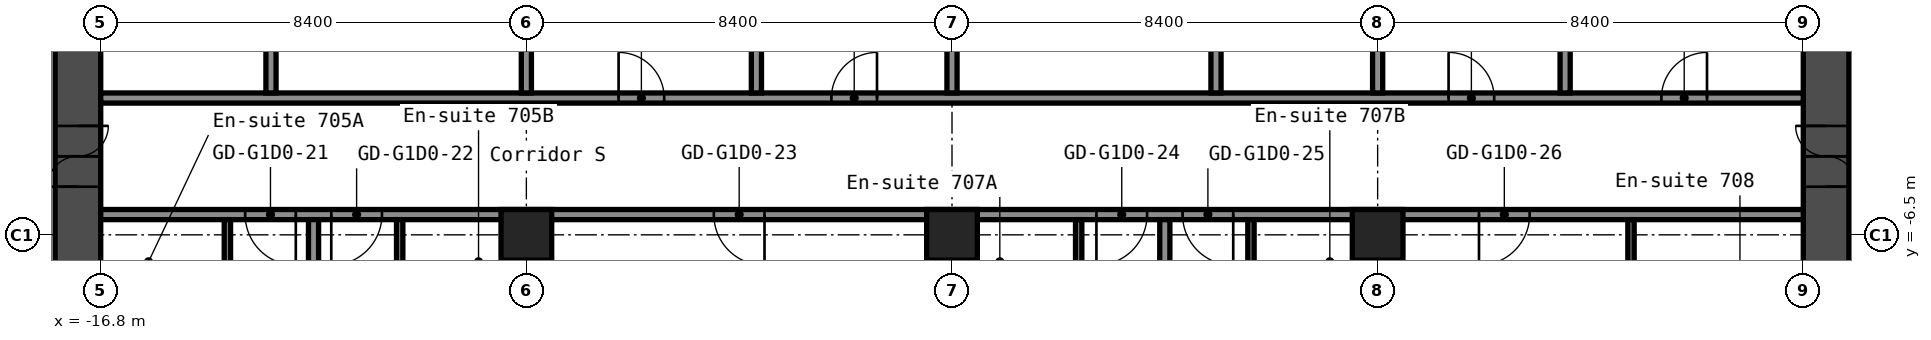
"""IFC4 building model, lengths in metres.
Left out: names, types, materials, properties, quantities, classifications, styles, units other than length and angle.
Written with IfcOpenShell. Run it as: python <this file> out.ifc"""

import sys

from ifc_helpers import new_model, si_unit, direction, frame, frame_2d, origin, origin_2d, place, context, subcontext, project, spatial, rectangle, hollow_rectangle, extrude, element, fill, save


model = new_model("IFC4")
c1 = context("Model", 3, precision=1e-05, world=origin(), true_north=direction((0.0, 1.0)))
c2 = subcontext(c1, "Body", "Model", "MODEL_VIEW")
j1 = project(units=[si_unit("LENGTHUNIT", "METRE"), si_unit("PLANEANGLEUNIT", "RADIAN")], contexts=[c1])
p1 = place(None, origin())
s1 = spatial("IfcSite", under=j1, at=p1, CompositionType="ELEMENT")
p2 = place(p1, origin())
s2 = spatial("IfcBuilding", under=s1, at=p2, CompositionType="ELEMENT")
p3 = place(p2, frame((0.0, 0.0, 29.4)))
s3 = spatial("IfcBuildingStorey", under=s2, at=p3, CompositionType="ELEMENT", Elevation=29.4)
for number, where, z_axis, x_axis in (
    (1, (-8.4, -6.5, 0.0), (0.0, 0.0, 1.0), (1.0, 0.0, 0.0)),
    (2, (0.0, -6.5, 0.0), (0.0, 0.0, 1.0), (1.0, 0.0, 0.0)),
    (3, (8.4, -6.5, 0.0), (0.0, 0.0, 1.0), (1.0, 0.0, 0.0)),
):
    element("IfcColumn", number, at=place(p3, frame(where, z_axis=z_axis, x_axis=x_axis)), inside=s3, PredefinedType="COLUMN", context=c2, shape_type="SweptSolid", body=[
        extrude(hollow_rectangle(XDim=1.0, YDim=1.0, WallThickness=0.04, at=origin_2d()), origin(), (0.0, 0.0, 1.0), 2.8),
    ])
p4 = place(p3, frame((-17.25, -8.4, 0.0), z_axis=(0.0, 0.0, 1.0), x_axis=(0.0, 1.0, 0.0)))
e4 = element("IfcWall", 4, at=p4, inside=s3, PredefinedType="SHEAR", context=c2, shape_type="SweptSolid", body=[
    extrude(rectangle(XDim=16.8, YDim=0.9, at=frame_2d((8.4, 0.0))), origin(), (0.0, 0.0, 1.0), 2.8),
])
p5 = place(p4, frame((12.75, 0.0, 0.0)))
e5 = element("IfcOpeningElement", 5, at=p5, cuts=e4, PredefinedType="OPENING", context=c2, shape_type="SweptSolid", body=[
    extrude(rectangle(XDim=1.2, YDim=2.1, at=frame_2d((0.6, 1.05))), frame((0.0, 0.46, 0.0), z_axis=(0.0, -1.0, 0.0), x_axis=(1.0, 0.0, 0.0)), (0.0, 0.0, 1.0), 0.92),
])
p6 = place(p4, frame((2.85, 0.0, 0.0)))
e6 = element("IfcOpeningElement", 6, at=p6, cuts=e4, PredefinedType="OPENING", context=c2, shape_type="SweptSolid", body=[
    extrude(rectangle(XDim=1.2, YDim=2.1, at=frame_2d((0.6, 1.05))), frame((0.0, 0.46, 0.0), z_axis=(0.0, -1.0, 0.0), x_axis=(1.0, 0.0, 0.0)), (0.0, 0.0, 1.0), 0.92),
])
p7 = place(p3, frame((17.25, -8.4, 0.0), z_axis=(0.0, 0.0, 1.0), x_axis=(0.0, 1.0, 0.0)))
e7 = element("IfcWall", 7, at=p7, inside=s3, PredefinedType="SHEAR", context=c2, shape_type="SweptSolid", body=[
    extrude(rectangle(XDim=16.8, YDim=0.9, at=frame_2d((8.4, 0.0))), origin(), (0.0, 0.0, 1.0), 2.8),
])
p8 = place(p7, frame((12.75, 0.0, 0.0)))
e8 = element("IfcOpeningElement", 8, at=p8, cuts=e7, PredefinedType="OPENING", context=c2, shape_type="SweptSolid", body=[
    extrude(rectangle(XDim=1.2, YDim=2.1, at=frame_2d((0.6, 1.05))), frame((0.0, 0.46, 0.0), z_axis=(0.0, -1.0, 0.0), x_axis=(1.0, 0.0, 0.0)), (0.0, 0.0, 1.0), 0.92),
])
p9 = place(p7, frame((2.85, 0.0, 0.0)))
e9 = element("IfcOpeningElement", 9, at=p9, cuts=e7, PredefinedType="OPENING", context=c2, shape_type="SweptSolid", body=[
    extrude(rectangle(XDim=1.2, YDim=2.1, at=frame_2d((0.6, 1.05))), frame((0.0, 0.46, 0.0), z_axis=(0.0, -1.0, 0.0), x_axis=(1.0, 0.0, 0.0)), (0.0, 0.0, 1.0), 0.92),
])
p10 = place(p3, frame((-16.8, -6.1, 0.0), z_axis=(0.0, 0.0, 1.0), x_axis=(1.0, 0.0, 0.0)))
e10 = element("IfcWall", 10, at=p10, inside=s3, PredefinedType="PARTITIONING", context=c2, shape_type="SweptSolid", body=[
    extrude(rectangle(XDim=33.6, YDim=0.2, at=frame_2d((16.8, 0.0))), origin(), (0.0, 0.0, 1.0), 2.8),
])
p11 = place(p10, frame((2.85, 0.0, 0.0)))
e11 = element("IfcOpeningElement", 11, at=p11, cuts=e10, PredefinedType="OPENING", context=c2, shape_type="SweptSolid", body=[
    extrude(rectangle(XDim=1.0, YDim=2.1, at=frame_2d((0.5, 1.05))), frame((0.0, 0.11, 0.0), z_axis=(0.0, -1.0, 0.0), x_axis=(1.0, 0.0, 0.0)), (0.0, 0.0, 1.0), 0.22),
])
p12 = place(p10, frame((4.55, 0.0, 0.0)))
e12 = element("IfcOpeningElement", 12, at=p12, cuts=e10, PredefinedType="OPENING", context=c2, shape_type="SweptSolid", body=[
    extrude(rectangle(XDim=1.0, YDim=2.1, at=frame_2d((0.5, 1.05))), frame((0.0, 0.11, 0.0), z_axis=(0.0, -1.0, 0.0), x_axis=(1.0, 0.0, 0.0)), (0.0, 0.0, 1.0), 0.22),
])
p13 = place(p10, frame((12.1, 0.0, 0.0)))
e13 = element("IfcOpeningElement", 13, at=p13, cuts=e10, PredefinedType="OPENING", context=c2, shape_type="SweptSolid", body=[
    extrude(rectangle(XDim=1.0, YDim=2.1, at=frame_2d((0.5, 1.05))), frame((0.0, 0.11, 0.0), z_axis=(0.0, -1.0, 0.0), x_axis=(1.0, 0.0, 0.0)), (0.0, 0.0, 1.0), 0.22),
])
p14 = place(p10, frame((19.65, 0.0, 0.0)))
e14 = element("IfcOpeningElement", 14, at=p14, cuts=e10, PredefinedType="OPENING", context=c2, shape_type="SweptSolid", body=[
    extrude(rectangle(XDim=1.0, YDim=2.1, at=frame_2d((0.5, 1.05))), frame((0.0, 0.11, 0.0), z_axis=(0.0, -1.0, 0.0), x_axis=(1.0, 0.0, 0.0)), (0.0, 0.0, 1.0), 0.22),
])
p15 = place(p10, frame((21.35, 0.0, 0.0)))
e15 = element("IfcOpeningElement", 15, at=p15, cuts=e10, PredefinedType="OPENING", context=c2, shape_type="SweptSolid", body=[
    extrude(rectangle(XDim=1.0, YDim=2.1, at=frame_2d((0.5, 1.05))), frame((0.0, 0.11, 0.0), z_axis=(0.0, -1.0, 0.0), x_axis=(1.0, 0.0, 0.0)), (0.0, 0.0, 1.0), 0.22),
])
p16 = place(p10, frame((27.2, 0.0, 0.0)))
e16 = element("IfcOpeningElement", 16, at=p16, cuts=e10, PredefinedType="OPENING", context=c2, shape_type="SweptSolid", body=[
    extrude(rectangle(XDim=1.0, YDim=2.1, at=frame_2d((0.5, 1.05))), frame((0.0, 0.11, 0.0), z_axis=(0.0, -1.0, 0.0), x_axis=(1.0, 0.0, 0.0)), (0.0, 0.0, 1.0), 0.22),
])
p17 = place(p3, frame((-16.8, -3.8, 0.0), z_axis=(0.0, 0.0, 1.0), x_axis=(1.0, 0.0, 0.0)))
e17 = element("IfcWall", 17, at=p17, inside=s3, PredefinedType="PARTITIONING", context=c2, shape_type="SweptSolid", body=[
    extrude(rectangle(XDim=33.6, YDim=0.2, at=frame_2d((16.8, 0.0))), origin(), (0.0, 0.0, 1.0), 2.8),
])
p18 = place(p17, frame((10.22, 0.0, 0.0)))
e18 = element("IfcOpeningElement", 18, at=p18, cuts=e17, PredefinedType="OPENING", context=c2, shape_type="SweptSolid", body=[
    extrude(rectangle(XDim=0.9, YDim=2.1, at=frame_2d((0.45, 1.05))), frame((0.0, 0.11, 0.0), z_axis=(0.0, -1.0, 0.0), x_axis=(1.0, 0.0, 0.0)), (0.0, 0.0, 1.0), 0.22),
])
p19 = place(p17, frame((14.42, 0.0, 0.0)))
e19 = element("IfcOpeningElement", 19, at=p19, cuts=e17, PredefinedType="OPENING", context=c2, shape_type="SweptSolid", body=[
    extrude(rectangle(XDim=0.9, YDim=2.1, at=frame_2d((0.45, 1.05))), frame((0.0, 0.11, 0.0), z_axis=(0.0, -1.0, 0.0), x_axis=(1.0, 0.0, 0.0)), (0.0, 0.0, 1.0), 0.22),
])
p20 = place(p17, frame((26.6, 0.0, 0.0)))
e20 = element("IfcOpeningElement", 20, at=p20, cuts=e17, PredefinedType="OPENING", context=c2, shape_type="SweptSolid", body=[
    extrude(rectangle(XDim=0.9, YDim=2.1, at=frame_2d((0.45, 1.05))), frame((0.0, 0.11, 0.0), z_axis=(0.0, -1.0, 0.0), x_axis=(1.0, 0.0, 0.0)), (0.0, 0.0, 1.0), 0.22),
])
p21 = place(p17, frame((30.8, 0.0, 0.0)))
e21 = element("IfcOpeningElement", 21, at=p21, cuts=e17, PredefinedType="OPENING", context=c2, shape_type="SweptSolid", body=[
    extrude(rectangle(XDim=0.9, YDim=2.1, at=frame_2d((0.45, 1.05))), frame((0.0, 0.11, 0.0), z_axis=(0.0, -1.0, 0.0), x_axis=(1.0, 0.0, 0.0)), (0.0, 0.0, 1.0), 0.22),
])
p22 = place(p3, frame((-14.3, -9.1, 0.0), z_axis=(0.0, 0.0, 1.0), x_axis=(0.0, 1.0, 0.0)))
e22 = element("IfcWall", 22, at=p22, inside=s3, PredefinedType="PARTITIONING", context=c2, shape_type="SweptSolid", body=[
    extrude(rectangle(XDim=2.9, YDim=0.125, at=frame_2d((1.45, 0.0))), origin(), (0.0, 0.0, 1.0), 2.8),
])
p23 = place(p22, frame((0.6, 0.0, 0.0)))
e23 = element("IfcOpeningElement", 23, at=p23, cuts=e22, PredefinedType="OPENING", context=c2, shape_type="SweptSolid", body=[
    extrude(rectangle(XDim=0.8, YDim=2.1, at=frame_2d((0.4, 1.05))), frame((0.0, 0.073, 0.0), z_axis=(0.0, -1.0, 0.0), x_axis=(1.0, 0.0, 0.0)), (0.0, 0.0, 1.0), 0.145),
])
p24 = place(p3, frame((-13.44, -3.7, 0.0), z_axis=(0.0, 0.0, 1.0), x_axis=(0.0, 1.0, 0.0)))
e24 = element("IfcWall", 24, at=p24, inside=s3, PredefinedType="PARTITIONING", context=c2, shape_type="SweptSolid", body=[
    extrude(rectangle(XDim=7.4, YDim=0.2, at=frame_2d((3.7, 0.0))), origin(), (0.0, 0.0, 1.0), 2.8),
])
p25 = place(p3, frame((-12.6, -20.3, 0.0), z_axis=(0.0, 0.0, 1.0), x_axis=(0.0, 1.0, 0.0)))
e25 = element("IfcWall", 25, at=p25, inside=s3, PredefinedType="PARTITIONING", context=c2, shape_type="SweptSolid", body=[
    extrude(rectangle(XDim=14.1, YDim=0.2, at=frame_2d((7.05, 0.0))), origin(), (0.0, 0.0, 1.0), 2.8),
])
p26 = place(p3, frame((-10.9, -9.1, 0.0), z_axis=(0.0, 0.0, 1.0), x_axis=(0.0, 1.0, 0.0)))
e26 = element("IfcWall", 26, at=p26, inside=s3, PredefinedType="PARTITIONING", context=c2, shape_type="SweptSolid", body=[
    extrude(rectangle(XDim=2.9, YDim=0.125, at=frame_2d((1.45, 0.0))), origin(), (0.0, 0.0, 1.0), 2.8),
])
p27 = place(p26, frame((0.6, 0.0, 0.0)))
e27 = element("IfcOpeningElement", 27, at=p27, cuts=e26, PredefinedType="OPENING", context=c2, shape_type="SweptSolid", body=[
    extrude(rectangle(XDim=0.8, YDim=2.1, at=frame_2d((0.4, 1.05))), frame((0.0, 0.073, 0.0), z_axis=(0.0, -1.0, 0.0), x_axis=(1.0, 0.0, 0.0)), (0.0, 0.0, 1.0), 0.145),
])
p28 = place(p3, frame((-8.4, -20.3, 0.0), z_axis=(0.0, 0.0, 1.0), x_axis=(0.0, 1.0, 0.0)))
e28 = element("IfcWall", 28, at=p28, inside=s3, PredefinedType="PARTITIONING", context=c2, shape_type="SweptSolid", body=[
    extrude(rectangle(XDim=13.31, YDim=0.2, at=frame_2d((6.655, 0.0))), origin(), (0.0, 0.0, 1.0), 2.8),
])
for number, where, z_axis, x_axis in (
    (29, (-8.4, -3.7, 0.0), (0.0, 0.0, 1.0), (0.0, 1.0, 0.0)),
    (30, (-3.86, -3.7, 0.0), (0.0, 0.0, 1.0), (0.0, 1.0, 0.0)),
):
    element("IfcWall", number, at=place(p3, frame(where, z_axis=z_axis, x_axis=x_axis)), inside=s3, PredefinedType="PARTITIONING", context=c2, shape_type="SweptSolid", body=[
        extrude(rectangle(XDim=7.4, YDim=0.2, at=frame_2d((3.7, 0.0))), origin(), (0.0, 0.0, 1.0), 2.8),
    ])
p29 = place(p3, frame((0.0, -20.3, 0.0), z_axis=(0.0, 0.0, 1.0), x_axis=(0.0, 1.0, 0.0)))
e31 = element("IfcWall", 31, at=p29, inside=s3, PredefinedType="PARTITIONING", context=c2, shape_type="SweptSolid", body=[
    extrude(rectangle(XDim=13.31, YDim=0.2, at=frame_2d((6.655, 0.0))), origin(), (0.0, 0.0, 1.0), 2.8),
])
p30 = place(p3, frame((0.0, -3.7, 0.0), z_axis=(0.0, 0.0, 1.0), x_axis=(0.0, 1.0, 0.0)))
e32 = element("IfcWall", 32, at=p30, inside=s3, PredefinedType="PARTITIONING", context=c2, shape_type="SweptSolid", body=[
    extrude(rectangle(XDim=7.4, YDim=0.2, at=frame_2d((3.7, 0.0))), origin(), (0.0, 0.0, 1.0), 2.8),
])
p31 = place(p3, frame((2.5, -9.1, 0.0), z_axis=(0.0, 0.0, 1.0), x_axis=(0.0, 1.0, 0.0)))
e33 = element("IfcWall", 33, at=p31, inside=s3, PredefinedType="PARTITIONING", context=c2, shape_type="SweptSolid", body=[
    extrude(rectangle(XDim=2.9, YDim=0.125, at=frame_2d((1.45, 0.0))), origin(), (0.0, 0.0, 1.0), 2.8),
])
p32 = place(p31, frame((0.6, 0.0, 0.0)))
e34 = element("IfcOpeningElement", 34, at=p32, cuts=e33, PredefinedType="OPENING", context=c2, shape_type="SweptSolid", body=[
    extrude(rectangle(XDim=0.8, YDim=2.1, at=frame_2d((0.4, 1.05))), frame((0.0, 0.073, 0.0), z_axis=(0.0, -1.0, 0.0), x_axis=(1.0, 0.0, 0.0)), (0.0, 0.0, 1.0), 0.145),
])
p33 = place(p3, frame((4.2, -20.3, 0.0), z_axis=(0.0, 0.0, 1.0), x_axis=(0.0, 1.0, 0.0)))
e35 = element("IfcWall", 35, at=p33, inside=s3, PredefinedType="PARTITIONING", context=c2, shape_type="SweptSolid", body=[
    extrude(rectangle(XDim=14.1, YDim=0.2, at=frame_2d((7.05, 0.0))), origin(), (0.0, 0.0, 1.0), 2.8),
])
p34 = place(p3, frame((5.21, -3.7, 0.0), z_axis=(0.0, 0.0, 1.0), x_axis=(0.0, 1.0, 0.0)))
e36 = element("IfcWall", 36, at=p34, inside=s3, PredefinedType="PARTITIONING", context=c2, shape_type="SweptSolid", body=[
    extrude(rectangle(XDim=7.4, YDim=0.2, at=frame_2d((3.7, 0.0))), origin(), (0.0, 0.0, 1.0), 2.8),
])
p35 = place(p3, frame((5.9, -9.1, 0.0), z_axis=(0.0, 0.0, 1.0), x_axis=(0.0, 1.0, 0.0)))
e37 = element("IfcWall", 37, at=p35, inside=s3, PredefinedType="PARTITIONING", context=c2, shape_type="SweptSolid", body=[
    extrude(rectangle(XDim=2.9, YDim=0.125, at=frame_2d((1.45, 0.0))), origin(), (0.0, 0.0, 1.0), 2.8),
])
p36 = place(p35, frame((0.6, 0.0, 0.0)))
e38 = element("IfcOpeningElement", 38, at=p36, cuts=e37, PredefinedType="OPENING", context=c2, shape_type="SweptSolid", body=[
    extrude(rectangle(XDim=0.8, YDim=2.1, at=frame_2d((0.4, 1.05))), frame((0.0, 0.073, 0.0), z_axis=(0.0, -1.0, 0.0), x_axis=(1.0, 0.0, 0.0)), (0.0, 0.0, 1.0), 0.145),
])
p37 = place(p3, frame((8.4, -20.3, 0.0), z_axis=(0.0, 0.0, 1.0), x_axis=(0.0, 1.0, 0.0)))
e39 = element("IfcWall", 39, at=p37, inside=s3, PredefinedType="PARTITIONING", context=c2, shape_type="SweptSolid", body=[
    extrude(rectangle(XDim=13.31, YDim=0.2, at=frame_2d((6.655, 0.0))), origin(), (0.0, 0.0, 1.0), 2.8),
])
for number, where, z_axis, x_axis in (
    (40, (8.4, -3.7, 0.0), (0.0, 0.0, 1.0), (0.0, 1.0, 0.0)),
    (41, (12.1, -3.7, 0.0), (0.0, 0.0, 1.0), (0.0, 1.0, 0.0)),
):
    element("IfcWall", number, at=place(p3, frame(where, z_axis=z_axis, x_axis=x_axis)), inside=s3, PredefinedType="PARTITIONING", context=c2, shape_type="SweptSolid", body=[
        extrude(rectangle(XDim=7.4, YDim=0.2, at=frame_2d((3.7, 0.0))), origin(), (0.0, 0.0, 1.0), 2.8),
    ])
p38 = place(p3, frame((13.4, -9.5, 0.0), z_axis=(0.0, 0.0, 1.0), x_axis=(0.0, 1.0, 0.0)))
e42 = element("IfcWall", 42, at=p38, inside=s3, PredefinedType="PARTITIONING", context=c2, shape_type="SweptSolid", body=[
    extrude(rectangle(XDim=3.3, YDim=0.125, at=frame_2d((1.65, 0.0))), origin(), (0.0, 0.0, 1.0), 2.8),
])
p39 = place(p6, origin())
e43 = element("IfcDoor", 43, at=p39, inside=s3, OperationType="DOUBLE_DOOR_SINGLE_SWING", PredefinedType="DOOR", context=c2, shape_type="SweptSolid", body=[
    extrude(rectangle(XDim=1.2, YDim=2.1, at=frame_2d((0.6, 1.05))), frame((0.0, 0.025, 0.0), z_axis=(0.0, -1.0, 0.0), x_axis=(1.0, 0.0, 0.0)), (0.0, 0.0, 1.0), 0.05),
])
fill(e6, e43)
p40 = place(p9, origin())
e44 = element("IfcDoor", 44, at=p40, inside=s3, OperationType="DOUBLE_DOOR_SINGLE_SWING", PredefinedType="DOOR", context=c2, shape_type="SweptSolid", body=[
    extrude(rectangle(XDim=1.2, YDim=2.1, at=frame_2d((0.6, 1.05))), frame((0.0, 0.025, 0.0), z_axis=(0.0, -1.0, 0.0), x_axis=(1.0, 0.0, 0.0)), (0.0, 0.0, 1.0), 0.05),
])
fill(e9, e44)
p41 = place(p11, origin())
e45 = element("IfcDoor", 45, at=p41, inside=s3, OperationType="SINGLE_SWING_RIGHT", PredefinedType="DOOR", context=c2, shape_type="SweptSolid", body=[
    extrude(rectangle(XDim=1.0, YDim=2.1, at=frame_2d((0.5, 1.05))), frame((0.0, 0.025, 0.0), z_axis=(0.0, -1.0, 0.0), x_axis=(1.0, 0.0, 0.0)), (0.0, 0.0, 1.0), 0.05),
])
fill(e11, e45)
p42 = place(p12, origin())
e46 = element("IfcDoor", 46, at=p42, inside=s3, OperationType="SINGLE_SWING_LEFT", PredefinedType="DOOR", context=c2, shape_type="SweptSolid", body=[
    extrude(rectangle(XDim=1.0, YDim=2.1, at=frame_2d((0.5, 1.05))), frame((0.0, 0.025, 0.0), z_axis=(0.0, -1.0, 0.0), x_axis=(1.0, 0.0, 0.0)), (0.0, 0.0, 1.0), 0.05),
])
fill(e12, e46)
p43 = place(p13, origin())
e47 = element("IfcDoor", 47, at=p43, inside=s3, OperationType="SINGLE_SWING_RIGHT", PredefinedType="DOOR", context=c2, shape_type="SweptSolid", body=[
    extrude(rectangle(XDim=1.0, YDim=2.1, at=frame_2d((0.5, 1.05))), frame((0.0, 0.025, 0.0), z_axis=(0.0, -1.0, 0.0), x_axis=(1.0, 0.0, 0.0)), (0.0, 0.0, 1.0), 0.05),
])
fill(e13, e47)
p44 = place(p14, origin())
e48 = element("IfcDoor", 48, at=p44, inside=s3, OperationType="SINGLE_SWING_LEFT", PredefinedType="DOOR", context=c2, shape_type="SweptSolid", body=[
    extrude(rectangle(XDim=1.0, YDim=2.1, at=frame_2d((0.5, 1.05))), frame((0.0, 0.025, 0.0), z_axis=(0.0, -1.0, 0.0), x_axis=(1.0, 0.0, 0.0)), (0.0, 0.0, 1.0), 0.05),
])
fill(e14, e48)
p45 = place(p15, origin())
e49 = element("IfcDoor", 49, at=p45, inside=s3, OperationType="SINGLE_SWING_RIGHT", PredefinedType="DOOR", context=c2, shape_type="SweptSolid", body=[
    extrude(rectangle(XDim=1.0, YDim=2.1, at=frame_2d((0.5, 1.05))), frame((0.0, 0.025, 0.0), z_axis=(0.0, -1.0, 0.0), x_axis=(1.0, 0.0, 0.0)), (0.0, 0.0, 1.0), 0.05),
])
fill(e15, e49)
p46 = place(p16, origin())
e50 = element("IfcDoor", 50, at=p46, inside=s3, OperationType="SINGLE_SWING_LEFT", PredefinedType="DOOR", context=c2, shape_type="SweptSolid", body=[
    extrude(rectangle(XDim=1.0, YDim=2.1, at=frame_2d((0.5, 1.05))), frame((0.0, 0.025, 0.0), z_axis=(0.0, -1.0, 0.0), x_axis=(1.0, 0.0, 0.0)), (0.0, 0.0, 1.0), 0.05),
])
fill(e16, e50)
p47 = place(p18, origin())
e51 = element("IfcDoor", 51, at=p47, inside=s3, OperationType="SINGLE_SWING_RIGHT", PredefinedType="DOOR", context=c2, shape_type="SweptSolid", body=[
    extrude(rectangle(XDim=0.9, YDim=2.1, at=frame_2d((0.45, 1.05))), frame((0.0, 0.025, 0.0), z_axis=(0.0, -1.0, 0.0), x_axis=(1.0, 0.0, 0.0)), (0.0, 0.0, 1.0), 0.05),
])
fill(e18, e51)
p48 = place(p19, origin())
e52 = element("IfcDoor", 52, at=p48, inside=s3, OperationType="SINGLE_SWING_LEFT", PredefinedType="DOOR", context=c2, shape_type="SweptSolid", body=[
    extrude(rectangle(XDim=0.9, YDim=2.1, at=frame_2d((0.45, 1.05))), frame((0.0, 0.025, 0.0), z_axis=(0.0, -1.0, 0.0), x_axis=(1.0, 0.0, 0.0)), (0.0, 0.0, 1.0), 0.05),
])
fill(e19, e52)
p49 = place(p20, origin())
e53 = element("IfcDoor", 53, at=p49, inside=s3, OperationType="SINGLE_SWING_RIGHT", PredefinedType="DOOR", context=c2, shape_type="SweptSolid", body=[
    extrude(rectangle(XDim=0.9, YDim=2.1, at=frame_2d((0.45, 1.05))), frame((0.0, 0.025, 0.0), z_axis=(0.0, -1.0, 0.0), x_axis=(1.0, 0.0, 0.0)), (0.0, 0.0, 1.0), 0.05),
])
fill(e20, e53)
p50 = place(p21, origin())
e54 = element("IfcDoor", 54, at=p50, inside=s3, OperationType="SINGLE_SWING_LEFT", PredefinedType="DOOR", context=c2, shape_type="SweptSolid", body=[
    extrude(rectangle(XDim=0.9, YDim=2.1, at=frame_2d((0.45, 1.05))), frame((0.0, 0.025, 0.0), z_axis=(0.0, -1.0, 0.0), x_axis=(1.0, 0.0, 0.0)), (0.0, 0.0, 1.0), 0.05),
])
fill(e21, e54)
save(model, sys.argv[1])
